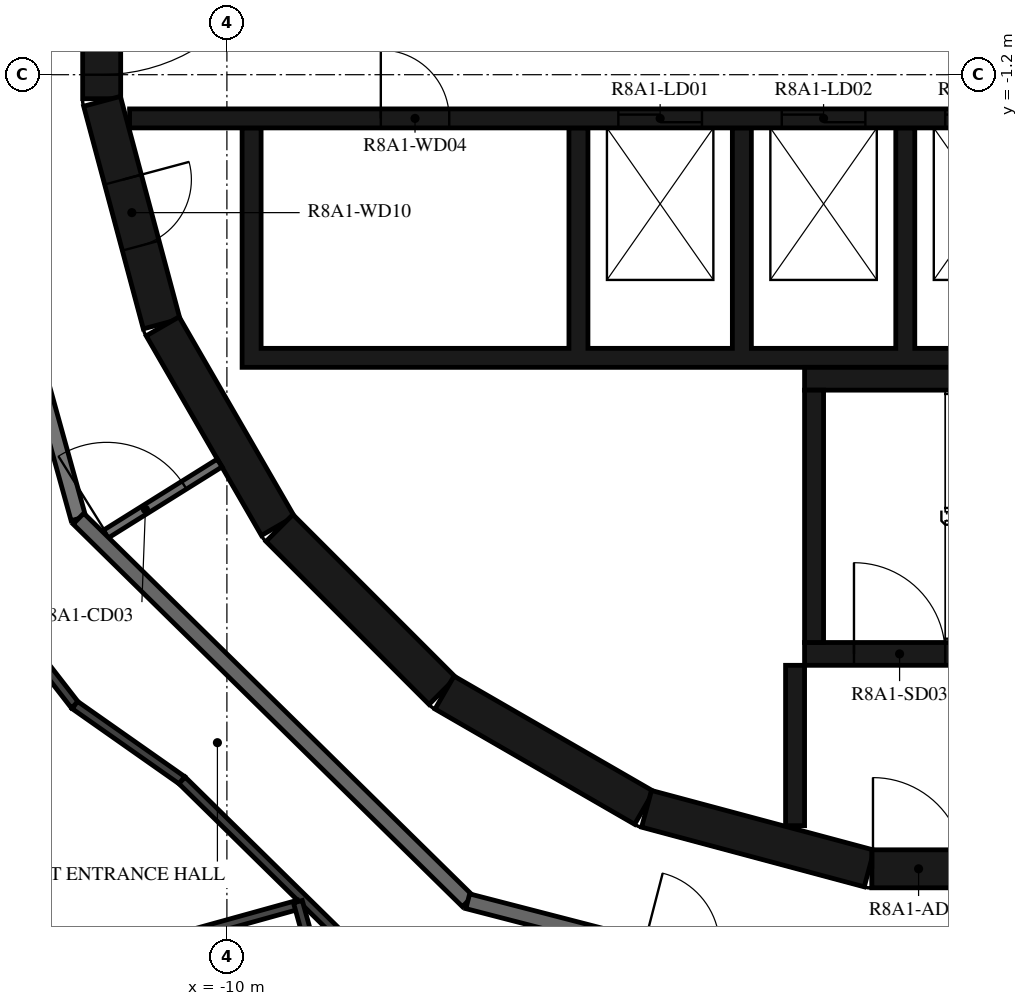
"""IFC4 building model, lengths in metres.
Left out: names, types, materials, properties, quantities, classifications, styles, units other than length and angle.
Written with IfcOpenShell. Run it as: python <this file> out.ifc"""

import sys

from ifc_helpers import new_model, si_unit, direction, frame, frame_2d, origin, place, context, subcontext, project, spatial, polyline, rectangle, outline, extrude, element, fill, save


model = new_model("IFC4")
c1 = context("Model", 3, precision=1e-05, world=origin(), true_north=direction((0.0, 1.0)))
c2 = subcontext(c1, "Body", "Model", "MODEL_VIEW")
j1 = project(units=[si_unit("LENGTHUNIT", "METRE"), si_unit("PLANEANGLEUNIT", "RADIAN")], contexts=[c1])
p1 = place(None, origin())
s1 = spatial("IfcSite", under=j1, at=p1, CompositionType="ELEMENT")
p2 = place(p1, origin())
s2 = spatial("IfcBuilding", under=s1, at=p2, CompositionType="ELEMENT")
p3 = place(p2, frame((0.0, 0.0, 301.7)))
s3 = spatial("IfcBuildingStorey", under=s2, at=p3, CompositionType="ELEMENT", Elevation=301.7)
p4 = place(p3, frame((-11.647, 1.516, 0.0), z_axis=(0.0, 0.0, 1.0), x_axis=(0.0, -1.0, 0.0)))
e1 = element("IfcWall", 1, at=p4, inside=s3, PredefinedType="SHEAR", context=c2, shape_type="SweptSolid", body=[
    extrude(rectangle(XDim=3.033, YDim=0.5, at=frame_2d((1.516, 0.0))), origin(), (0.0, 0.0, 1.0), 3.12),
])
p5 = place(p4, frame((0.316, 0.0, 0.0)))
e2 = element("IfcOpeningElement", 2, at=p5, cuts=e1, PredefinedType="OPENING", context=c2, shape_type="SweptSolid", body=[
    extrude(rectangle(XDim=2.4, YDim=2.1, at=frame_2d((1.2, 1.05))), frame((0.0, 0.26, 0.0), z_axis=(0.0, -1.0, 0.0), x_axis=(1.0, 0.0, 0.0)), (0.0, 0.0, 1.0), 0.52),
])
p6 = place(p3, frame((-11.643, -1.55, 0.0), z_axis=(0.0, 0.0, 1.0), x_axis=(0.258734743916, -0.965948410781, 0.0)))
e3 = element("IfcWall", 3, at=p6, inside=s3, PredefinedType="SHEAR", context=c2, shape_type="SweptSolid", body=[
    extrude(rectangle(XDim=3.033, YDim=0.5, at=frame_2d((1.516, 0.0))), origin(), (0.0, 0.0, 1.0), 3.12),
])
p7 = place(p6, frame((1.066, 0.0, 0.0)))
e4 = element("IfcOpeningElement", 4, at=p7, cuts=e3, PredefinedType="OPENING", context=c2, shape_type="SweptSolid", body=[
    extrude(rectangle(XDim=0.9, YDim=2.1, at=frame_2d((0.45, 1.05))), frame((0.0, 0.26, 0.0), z_axis=(0.0, -1.0, 0.0), x_axis=(1.0, 0.0, 0.0)), (0.0, 0.0, 1.0), 0.52),
])
p8 = place(p3, frame((-10.845, -4.51, 0.0), z_axis=(0.0, 0.0, 1.0), x_axis=(0.500087131594, -0.865975092491, 0.0)))
e5 = element("IfcWall", 5, at=p8, inside=s3, PredefinedType="SHEAR", context=c2, shape_type="SweptSolid", body=[
    extrude(rectangle(XDim=3.033, YDim=0.5, at=frame_2d((1.516, 0.0))), origin(), (0.0, 0.0, 1.0), 3.12),
])
p9 = place(p3, frame((-9.308, -7.164, 0.0), z_axis=(0.0, 0.0, 1.0), x_axis=(0.707106781187, -0.707106781187, 0.0)))
e6 = element("IfcWall", 6, at=p9, inside=s3, PredefinedType="SHEAR", context=c2, shape_type="SweptSolid", body=[
    extrude(rectangle(XDim=3.032, YDim=0.5, at=frame_2d((1.516, 0.0))), origin(), (0.0, 0.0, 1.0), 3.12),
])
for number, where, z_axis, x_axis in (
    (7, (-7.137, -9.329, 0.0), (0.0, 0.0, 1.0), (0.866, -0.5, 0.0)),
    (8, (-4.479, -10.858, 0.0), (0.0, 0.0, 1.0), (0.966, -0.259, 0.0)),
):
    element("IfcWall", number, at=place(p3, frame(where, z_axis=z_axis, x_axis=x_axis)), inside=s3, PredefinedType="SHEAR", context=c2, shape_type="SweptSolid", body=[
        extrude(rectangle(XDim=3.033, YDim=0.5, at=frame_2d((1.516, 0.0))), origin(), (0.0, 0.0, 1.0), 3.12),
    ])
p10 = place(p3, frame((-1.516, -11.647, 0.0), z_axis=(0.0, 0.0, 1.0), x_axis=(1.0, 0.0, 0.0)))
e9 = element("IfcWall", 9, at=p10, inside=s3, PredefinedType="SHEAR", context=c2, shape_type="SweptSolid", body=[
    extrude(rectangle(XDim=3.033, YDim=0.5, at=frame_2d((1.516, 0.0))), origin(), (0.0, 0.0, 1.0), 3.12),
])
p11 = place(p10, frame((0.016, 0.0, 0.0)))
e10 = element("IfcOpeningElement", 10, at=p11, cuts=e9, PredefinedType="OPENING", context=c2, shape_type="SweptSolid", body=[
    extrude(rectangle(XDim=1.2, YDim=2.1, at=frame_2d((0.6, 1.05))), frame((0.0, 0.26, 0.0), z_axis=(0.0, -1.0, 0.0), x_axis=(1.0, 0.0, 0.0)), (0.0, 0.0, 1.0), 0.52),
])
p12 = place(p3, frame((-2.275, -8.67, 0.0), z_axis=(0.0, 0.0, 1.0), x_axis=(0.0, 1.0, 0.0)))
e11 = element("IfcWall", 11, at=p12, inside=s3, PredefinedType="SHEAR", context=c2, shape_type="SweptSolid", body=[
    extrude(rectangle(XDim=3.32, YDim=0.25, at=frame_2d((1.66, 0.0))), origin(), (0.0, 0.0, 1.0), 3.12),
])
p13 = place(p3, frame((-2.4, -5.2, 0.0), z_axis=(0.0, 0.0, 1.0), x_axis=(1.0, 0.0, 0.0)))
e12 = element("IfcWall", 12, at=p13, inside=s3, PredefinedType="SHEAR", context=c2, shape_type="SweptSolid", body=[
    extrude(rectangle(XDim=7.05, YDim=0.3, at=frame_2d((3.525, 0.0))), origin(), (0.0, 0.0, 1.0), 3.12),
])
p14 = place(p3, frame((-2.4, -8.82, 0.0), z_axis=(0.0, 0.0, 1.0), x_axis=(1.0, 0.0, 0.0)))
e13 = element("IfcWall", 13, at=p14, inside=s3, PredefinedType="SHEAR", context=c2, shape_type="SweptSolid", body=[
    extrude(rectangle(XDim=2.5, YDim=0.3, at=frame_2d((1.25, 0.0))), origin(), (0.0, 0.0, 1.0), 3.12),
])
p15 = place(p14, frame((0.65, 0.0, 0.0)))
e14 = element("IfcOpeningElement", 14, at=p15, cuts=e13, PredefinedType="OPENING", context=c2, shape_type="SweptSolid", body=[
    extrude(rectangle(XDim=1.2, YDim=2.1, at=frame_2d((0.6, 1.05))), frame((0.0, 0.16, 0.0), z_axis=(0.0, -1.0, 0.0), x_axis=(1.0, 0.0, 0.0)), (0.0, 0.0, 1.0), 0.32),
])
p16 = place(p3, frame((-2.525, -8.97, 0.0), z_axis=(0.0, 0.0, 1.0), x_axis=(0.0, -1.0, 0.0)))
e15 = element("IfcWall", 15, at=p16, inside=s3, PredefinedType="SHEAR", context=c2, shape_type="SweptSolid", body=[
    extrude(rectangle(XDim=2.11, YDim=0.25, at=frame_2d((1.055, 0.0))), origin(), (0.0, 0.0, 1.0), 3.12),
])
p17 = place(p3, origin())
e16 = element("IfcWall", 16, at=p17, inside=s3, PredefinedType="SHEAR", context=c2, shape_type="SweptSolid", body=[
    extrude(outline(polyline([(9.8, -5.05), (9.8, -4.8), (9.8, -1.9), (9.55, -1.9), (9.55, -4.8), (7.65, -4.8), (7.65, -1.9), (7.4, -1.9), (7.4, -4.8), (5.5, -4.8), (5.5, -1.9), (5.25, -1.9), (5.25, -4.8), (3.35, -4.8), (3.35, -1.9), (3.1, -1.9), (3.1, -4.8), (1.2, -4.8), (1.2, -1.9), (0.95, -1.9), (0.95, -4.8), (-0.95, -4.8), (-0.95, -1.9), (-1.2, -1.9), (-1.2, -4.8), (-3.1, -4.8), (-3.1, -1.9), (-3.35, -1.9), (-3.35, -4.8), (-5.25, -4.8), (-5.25, -1.9), (-5.5, -1.9), (-5.5, -4.8), (-9.55, -4.8), (-9.55, -1.9), (-9.8, -1.9), (-9.8, -4.8), (-9.8, -5.05), (9.8, -5.05)])), origin(), (0.0, 0.0, 1.0), 3.12),
])
p18 = place(p3, frame((-11.28, -1.775, 0.0), z_axis=(0.0, 0.0, 1.0), x_axis=(1.0, 0.0, 0.0)))
e17 = element("IfcWall", 17, at=p18, inside=s3, PredefinedType="SHEAR", context=c2, shape_type="SweptSolid", body=[
    extrude(rectangle(XDim=14.38, YDim=0.25, at=frame_2d((7.19, 0.0))), origin(), (0.0, 0.0, 1.0), 3.12),
])
p19 = place(p18, frame((6.43, 0.0, 0.0)))
e18 = element("IfcOpeningElement", 18, at=p19, cuts=e17, PredefinedType="OPENING", context=c2, shape_type="SweptSolid", body=[
    extrude(rectangle(XDim=1.1, YDim=2.1, at=frame_2d((0.55, 1.05))), frame((0.0, 0.135, 0.0), z_axis=(0.0, -1.0, 0.0), x_axis=(1.0, 0.0, 0.0)), (0.0, 0.0, 1.0), 0.27),
])
p20 = place(p18, frame((8.58, 0.0, 0.0)))
e19 = element("IfcOpeningElement", 19, at=p20, cuts=e17, PredefinedType="OPENING", context=c2, shape_type="SweptSolid", body=[
    extrude(rectangle(XDim=1.1, YDim=2.1, at=frame_2d((0.55, 1.05))), frame((0.0, 0.135, 0.0), z_axis=(0.0, -1.0, 0.0), x_axis=(1.0, 0.0, 0.0)), (0.0, 0.0, 1.0), 0.27),
])
p21 = place(p18, frame((10.73, 0.0, 0.0)))
e20 = element("IfcOpeningElement", 20, at=p21, cuts=e17, PredefinedType="OPENING", context=c2, shape_type="SweptSolid", body=[
    extrude(rectangle(XDim=1.1, YDim=2.1, at=frame_2d((0.55, 1.05))), frame((0.0, 0.135, 0.0), z_axis=(0.0, -1.0, 0.0), x_axis=(1.0, 0.0, 0.0)), (0.0, 0.0, 1.0), 0.27),
])
p22 = place(p18, frame((3.305, 0.0, 0.0)))
e21 = element("IfcOpeningElement", 21, at=p22, cuts=e17, PredefinedType="OPENING", context=c2, shape_type="SweptSolid", body=[
    extrude(rectangle(XDim=0.9, YDim=2.1, at=frame_2d((0.45, 1.05))), frame((0.0, 0.135, 0.0), z_axis=(0.0, -1.0, 0.0), x_axis=(1.0, 0.0, 0.0)), (0.0, 0.0, 1.0), 0.27),
])
p23 = place(p18, frame((12.98, 0.0, 0.0)))
e22 = element("IfcOpeningElement", 22, at=p23, cuts=e17, PredefinedType="OPENING", context=c2, shape_type="SweptSolid", body=[
    extrude(rectangle(XDim=0.9, YDim=2.1, at=frame_2d((0.45, 1.05))), frame((0.0, 0.135, 0.0), z_axis=(0.0, -1.0, 0.0), x_axis=(1.0, 0.0, 0.0)), (0.0, 0.0, 1.0), 0.27),
])
p24 = place(p3, frame((-11.687, -7.303, 0.0), z_axis=(0.0, 0.0, 1.0), x_axis=(0.848064094072, 0.529893661357, 0.0)))
e23 = element("IfcWall", 23, at=p24, inside=s3, PredefinedType="PARTITIONING", context=c2, shape_type="SweptSolid", body=[
    extrude(rectangle(XDim=1.876, YDim=0.12, at=frame_2d((0.938, 0.0))), origin(), (0.0, 0.0, 1.0), 3.12),
])
p25 = place(p24, frame((0.125, 0.0, 0.0)))
e24 = element("IfcOpeningElement", 24, at=p25, cuts=e23, PredefinedType="OPENING", context=c2, shape_type="SweptSolid", body=[
    extrude(rectangle(XDim=1.2, YDim=2.1, at=frame_2d((0.6, 1.05))), frame((0.0, 0.07, 0.0), z_axis=(0.0, -1.0, 0.0), x_axis=(1.0, 0.0, 0.0)), (0.0, 0.0, 1.0), 0.14),
])
p26 = place(p3, frame((-13.872, -0.121, 0.0), z_axis=(0.0, 0.0, 1.0), x_axis=(0.267254575108, -0.963625960674, 0.0)))
e25 = element("IfcWall", 25, at=p26, inside=s3, PredefinedType="STANDARD", context=c2, shape_type="SweptSolid", body=[
    extrude(rectangle(XDim=7.181, YDim=0.2, at=frame_2d((3.591, 0.0))), origin(), (0.0, 0.0, 1.0), 3.12),
])
p27 = place(p3, frame((-11.953, -7.041, 0.0), z_axis=(0.0, 0.0, 1.0), x_axis=(0.713250549143, -0.70090916255, 0.0)))
e26 = element("IfcWall", 26, at=p27, inside=s3, PredefinedType="STANDARD", context=c2, shape_type="SweptSolid", body=[
    extrude(rectangle(XDim=7.181, YDim=0.2, at=frame_2d((3.59, 0.0))), origin(), (0.0, 0.0, 1.0), 3.12),
])
p28 = place(p3, frame((-6.831, -12.074, 0.0), z_axis=(0.0, 0.0, 1.0), x_axis=(0.968144780225, -0.250391063186, 0.0)))
e27 = element("IfcWall", 27, at=p28, inside=s3, PredefinedType="STANDARD", context=c2, shape_type="SweptSolid", body=[
    extrude(rectangle(XDim=7.181, YDim=0.2, at=frame_2d((3.591, 0.0))), origin(), (0.0, 0.0, 1.0), 3.12),
])
p29 = place(p28, frame((2.39, 0.0, 0.0)))
e28 = element("IfcOpeningElement", 28, at=p29, cuts=e27, PredefinedType="OPENING", context=c2, shape_type="SweptSolid", body=[
    extrude(rectangle(XDim=1.0, YDim=2.1, at=frame_2d((0.5, 1.05))), frame((0.0, 0.11, 0.0), z_axis=(0.0, -1.0, 0.0), x_axis=(1.0, 0.0, 0.0)), (0.0, 0.0, 1.0), 0.22),
])
p30 = place(p28, frame((5.69, 0.0, 0.0)))
e29 = element("IfcOpeningElement", 29, at=p30, cuts=e27, PredefinedType="OPENING", context=c2, shape_type="SweptSolid", body=[
    extrude(rectangle(XDim=1.0, YDim=2.1, at=frame_2d((0.5, 1.05))), frame((0.0, 0.11, 0.0), z_axis=(0.0, -1.0, 0.0), x_axis=(1.0, 0.0, 0.0)), (0.0, 0.0, 1.0), 0.22),
])
p31 = place(p3, frame((-13.291, -7.829, 0.0), z_axis=(0.0, 0.0, 1.0), x_axis=(0.613017069232, -0.790069663277, 0.0)))
e30 = element("IfcWall", 30, at=p31, inside=s3, PredefinedType="PARTITIONING", context=c2, shape_type="SweptSolid", body=[
    extrude(rectangle(XDim=2.106, YDim=0.12, at=frame_2d((1.053, 0.0))), origin(), (0.0, 0.0, 1.0), 3.12),
])
p32 = place(p3, frame((-12.0, -9.493, 0.0), z_axis=(0.0, 0.0, 1.0), x_axis=(0.818312362022, -0.57477376259, 0.0)))
e31 = element("IfcWall", 31, at=p32, inside=s3, PredefinedType="PARTITIONING", context=c2, shape_type="SweptSolid", body=[
    extrude(rectangle(XDim=1.723, YDim=0.12, at=frame_2d((0.862, 0.0))), origin(), (0.0, 0.0, 1.0), 3.12),
])
p33 = place(p3, frame((-10.59, -10.483, 0.0), z_axis=(0.0, 0.0, 1.0), x_axis=(0.713244109461, -0.70091571556, 0.0)))
e32 = element("IfcWall", 32, at=p33, inside=s3, PredefinedType="PARTITIONING", context=c2, shape_type="SweptSolid", body=[
    extrude(rectangle(XDim=4.198, YDim=0.12, at=frame_2d((2.099, 0.0))), origin(), (0.0, 0.0, 1.0), 3.12),
])
p34 = place(p3, frame((-14.066, -13.508, 0.0), z_axis=(0.0, 0.0, 1.0), x_axis=(0.963643585504, 0.267191018032, 0.0)))
e33 = element("IfcWall", 33, at=p34, inside=s3, PredefinedType="PARTITIONING", context=c2, shape_type="SweptSolid", body=[
    extrude(rectangle(XDim=5.2, YDim=0.12, at=frame_2d((2.6, 0.0))), origin(), (0.0, 0.0, 1.0), 2.73),
])
p35 = place(p3, frame((-7.368, -18.202, 0.0), z_axis=(0.0, 0.0, 1.0), x_axis=(-0.26723158658, 0.963632336077, 0.0)))
e34 = element("IfcWall", 34, at=p35, inside=s3, PredefinedType="PARTITIONING", context=c2, shape_type="SweptSolid", body=[
    extrude(rectangle(XDim=6.353, YDim=0.12, at=frame_2d((3.177, 0.0))), origin(), (0.0, 0.0, 1.0), 3.12),
])
p36 = place(p35, frame((2.956, 0.0, 0.0)))
e35 = element("IfcOpeningElement", 35, at=p36, cuts=e34, PredefinedType="OPENING", context=c2, shape_type="SweptSolid", body=[
    extrude(rectangle(XDim=0.9, YDim=2.1, at=frame_2d((0.45, 1.05))), frame((0.0, 0.07, 0.0), z_axis=(0.0, -1.0, 0.0), x_axis=(1.0, 0.0, 0.0)), (0.0, 0.0, 1.0), 0.14),
])
p37 = place(p15, origin())
e36 = element("IfcDoor", 36, at=p37, inside=s3, OperationType="SINGLE_SWING_LEFT", PredefinedType="DOOR", context=c2, shape_type="SweptSolid", body=[
    extrude(rectangle(XDim=1.2, YDim=2.1, at=frame_2d((0.6, 1.05))), frame((0.0, 0.025, 0.0), z_axis=(0.0, -1.0, 0.0), x_axis=(1.0, 0.0, 0.0)), (0.0, 0.0, 1.0), 0.05),
])
fill(e14, e36)
p38 = place(p11, origin())
e37 = element("IfcDoor", 37, at=p38, inside=s3, OperationType="SINGLE_SWING_RIGHT", PredefinedType="DOOR", context=c2, shape_type="SweptSolid", body=[
    extrude(rectangle(XDim=1.2, YDim=2.1, at=frame_2d((0.6, 1.05))), frame((0.0, 0.025, 0.0), z_axis=(0.0, -1.0, 0.0), x_axis=(1.0, 0.0, 0.0)), (0.0, 0.0, 1.0), 0.05),
])
fill(e10, e37)
p39 = place(p5, origin())
e38 = element("IfcDoor", 38, at=p39, inside=s3, OperationType="DOUBLE_DOOR_SINGLE_SWING", PredefinedType="DOOR", context=c2, shape_type="SweptSolid", body=[
    extrude(rectangle(XDim=2.4, YDim=2.1, at=frame_2d((1.2, 1.05))), frame((0.0, 0.025, 0.0), z_axis=(0.0, -1.0, 0.0), x_axis=(1.0, 0.0, 0.0)), (0.0, 0.0, 1.0), 0.05),
])
fill(e2, e38)
p40 = place(p19, origin())
e39 = element("IfcDoor", 39, at=p40, inside=s3, OperationType="DOUBLE_DOOR_SLIDING", PredefinedType="DOOR", context=c2, shape_type="SweptSolid", body=[
    extrude(rectangle(XDim=1.1, YDim=2.1, at=frame_2d((0.55, 1.05))), frame((0.0, 0.025, 0.0), z_axis=(0.0, -1.0, 0.0), x_axis=(1.0, 0.0, 0.0)), (0.0, 0.0, 1.0), 0.05),
])
fill(e18, e39)
p41 = place(p20, origin())
e40 = element("IfcDoor", 40, at=p41, inside=s3, OperationType="DOUBLE_DOOR_SLIDING", PredefinedType="DOOR", context=c2, shape_type="SweptSolid", body=[
    extrude(rectangle(XDim=1.1, YDim=2.1, at=frame_2d((0.55, 1.05))), frame((0.0, 0.025, 0.0), z_axis=(0.0, -1.0, 0.0), x_axis=(1.0, 0.0, 0.0)), (0.0, 0.0, 1.0), 0.05),
])
fill(e19, e40)
p42 = place(p21, origin())
e41 = element("IfcDoor", 41, at=p42, inside=s3, OperationType="DOUBLE_DOOR_SLIDING", PredefinedType="DOOR", context=c2, shape_type="SweptSolid", body=[
    extrude(rectangle(XDim=1.1, YDim=2.1, at=frame_2d((0.55, 1.05))), frame((0.0, 0.025, 0.0), z_axis=(0.0, -1.0, 0.0), x_axis=(1.0, 0.0, 0.0)), (0.0, 0.0, 1.0), 0.05),
])
fill(e20, e41)
p43 = place(p22, origin())
e42 = element("IfcDoor", 42, at=p43, inside=s3, OperationType="SINGLE_SWING_RIGHT", PredefinedType="DOOR", context=c2, shape_type="SweptSolid", body=[
    extrude(rectangle(XDim=0.9, YDim=2.1, at=frame_2d((0.45, 1.05))), frame((0.0, 0.025, 0.0), z_axis=(0.0, -1.0, 0.0), x_axis=(1.0, 0.0, 0.0)), (0.0, 0.0, 1.0), 0.05),
])
fill(e21, e42)
p44 = place(p7, origin())
e43 = element("IfcDoor", 43, at=p44, inside=s3, OperationType="SINGLE_SWING_RIGHT", PredefinedType="DOOR", context=c2, shape_type="SweptSolid", body=[
    extrude(rectangle(XDim=0.9, YDim=2.1, at=frame_2d((0.45, 1.05))), frame((0.0, 0.025, 0.0), z_axis=(0.0, -1.0, 0.0), x_axis=(1.0, 0.0, 0.0)), (0.0, 0.0, 1.0), 0.05),
])
fill(e4, e43)
p45 = place(p25, origin())
e44 = element("IfcDoor", 44, at=p45, inside=s3, OperationType="DOUBLE_DOOR_SINGLE_SWING", PredefinedType="DOOR", context=c2, shape_type="SweptSolid", body=[
    extrude(rectangle(XDim=1.2, YDim=2.1, at=frame_2d((0.6, 1.05))), frame((0.0, 0.025, 0.0), z_axis=(0.0, -1.0, 0.0), x_axis=(1.0, 0.0, 0.0)), (0.0, 0.0, 1.0), 0.05),
])
fill(e24, e44)
save(model, sys.argv[1])
